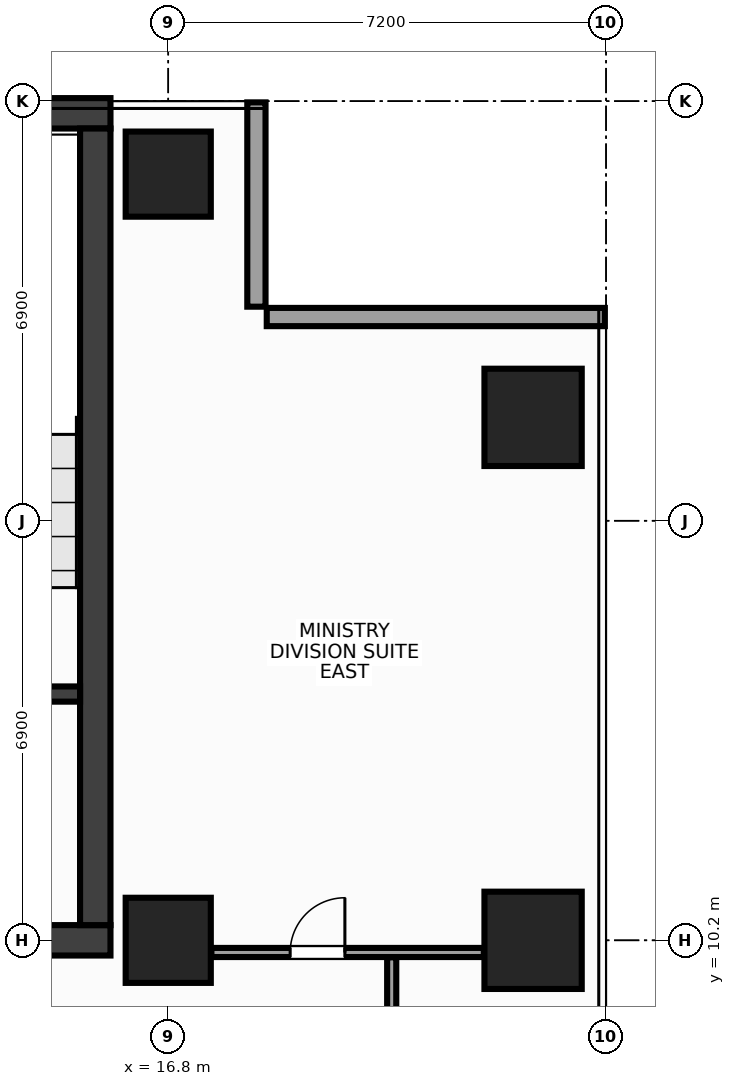
"""IFC4 building model, lengths in metres.
Left out: names, types, materials, properties, quantities, classifications, styles, units other than length and angle.
Written with IfcOpenShell. Run it as: python <this file> out.ifc"""

import sys

from ifc_helpers import new_model, si_unit, direction, frame, frame_2d, origin, origin_2d, place, context, subcontext, project, spatial, rectangle, extrude, source, transform, mapped, element, fill, save


model = new_model("IFC4")
c1 = context("Model", 3, precision=1e-05, world=origin(), true_north=direction((0.0, 1.0)))
c2 = subcontext(c1, "Body", "Model", "MODEL_VIEW")
j1 = project(units=[si_unit("LENGTHUNIT", "METRE"), si_unit("PLANEANGLEUNIT", "RADIAN")], contexts=[c1])
p1 = place(None, origin())
s1 = spatial("IfcSite", under=j1, at=p1, CompositionType="ELEMENT")
p2 = place(p1, origin())
s2 = spatial("IfcBuilding", under=s1, at=p2, CompositionType="ELEMENT")
p3 = place(p2, frame((0.0, 0.0, 210.8)))
s3 = spatial("IfcBuildingStorey", under=s2, at=p3, CompositionType="ELEMENT", Elevation=210.8)
m1 = source(origin(), c2, "Body", "SweptSolid", [
    extrude(rectangle(XDim=31.7, YDim=0.5, at=frame_2d((15.85, 0.0))), origin(), (0.0, 0.0, 1.0), 3.6),
])
p4 = place(p3, frame((-15.85, 23.8, 0.0), z_axis=(0.0, 0.0, 1.0), x_axis=(1.0, 0.0, 0.0)))
e1 = element("IfcWall", 1, at=p4, inside=s3, PredefinedType="SHEAR", context=c2, shape_type="MappedRepresentation", body=[
    mapped(m1, transform((0.0, 0.0, 0.0), x_axis=(1.0, 0.0, 0.0), y_axis=(0.0, 1.0, 0.0), z_axis=(0.0, 0.0, 1.0), scale=1.0)),
])
p5 = place(p3, frame((-15.85, 10.2, 0.0), z_axis=(0.0, 0.0, 1.0), x_axis=(1.0, 0.0, 0.0)))
e2 = element("IfcWall", 2, at=p5, inside=s3, PredefinedType="SHEAR", context=c2, shape_type="MappedRepresentation", body=[
    mapped(m1, transform((0.0, 0.0, 0.0), x_axis=(1.0, 0.0, 0.0), y_axis=(0.0, 1.0, 0.0), z_axis=(0.0, 0.0, 1.0), scale=1.0)),
])
p6 = place(p5, frame((1.7, 0.0, 0.0)))
e3 = element("IfcOpeningElement", 3, at=p6, cuts=e2, PredefinedType="OPENING", context=c2, shape_type="SweptSolid", body=[
    extrude(rectangle(XDim=1.6, YDim=2.15, at=frame_2d((0.8, 1.075))), frame((0.0, 0.262, 0.0), z_axis=(0.0, -1.0, 0.0), x_axis=(1.0, 0.0, 0.0)), (0.0, 0.0, 1.0), 0.524),
])
p7 = place(p5, frame((28.4, 0.0, 0.0)))
e4 = element("IfcOpeningElement", 4, at=p7, cuts=e2, PredefinedType="OPENING", context=c2, shape_type="SweptSolid", body=[
    extrude(rectangle(XDim=1.6, YDim=2.15, at=frame_2d((0.8, 1.075))), frame((0.0, 0.262, 0.0), z_axis=(0.0, -1.0, 0.0), x_axis=(1.0, 0.0, 0.0)), (0.0, 0.0, 1.0), 0.524),
])
p8 = place(p5, frame((15.1, 0.0, 0.0)))
e5 = element("IfcOpeningElement", 5, at=p8, cuts=e2, PredefinedType="OPENING", context=c2, shape_type="SweptSolid", body=[
    extrude(rectangle(XDim=1.5, YDim=2.2, at=frame_2d((0.75, 1.1))), frame((0.0, 0.262, 0.0), z_axis=(0.0, -1.0, 0.0), x_axis=(1.0, 0.0, 0.0)), (0.0, 0.0, 1.0), 0.524),
])
m2 = source(origin(), c2, "Body", "SweptSolid", [
    extrude(rectangle(XDim=13.1, YDim=0.5, at=frame_2d((6.55, 0.0))), origin(), (0.0, 0.0, 1.0), 3.6),
])
p9 = place(p3, frame((15.6, 10.45, 0.0), z_axis=(0.0, 0.0, 1.0), x_axis=(0.0, 1.0, 0.0)))
e6 = element("IfcWall", 6, at=p9, inside=s3, PredefinedType="SHEAR", context=c2, shape_type="MappedRepresentation", body=[
    mapped(m2, transform((0.0, 0.0, 0.0), x_axis=(1.0, 0.0, 0.0), y_axis=(0.0, 1.0, 0.0), z_axis=(0.0, 0.0, 1.0), scale=1.0)),
])
m3 = source(origin(), c2, "Body", "SweptSolid", [
    extrude(rectangle(XDim=3.705, YDim=0.25, at=frame_2d((1.853, 0.0))), origin(), (0.0, 0.0, 1.0), 3.6),
])
p10 = place(p3, frame((11.645, 14.25, 0.0), z_axis=(0.0, 0.0, 1.0), x_axis=(1.0, 0.0, 0.0)))
e7 = element("IfcWall", 7, at=p10, inside=s3, PredefinedType="SHEAR", context=c2, shape_type="MappedRepresentation", body=[
    mapped(m3, transform((0.0, 0.0, 0.0), x_axis=(1.0, 0.0, 0.0), y_axis=(0.0, 1.0, 0.0), z_axis=(0.0, 0.0, 1.0), scale=1.0)),
])
p11 = place(p10, frame((0.95, 0.0, 0.0)))
e8 = element("IfcOpeningElement", 8, at=p11, cuts=e7, PredefinedType="OPENING", context=c2, shape_type="SweptSolid", body=[
    extrude(rectangle(XDim=1.6, YDim=2.15, at=frame_2d((0.8, 1.075))), frame((0.0, 0.137, 0.0), z_axis=(0.0, -1.0, 0.0), x_axis=(1.0, 0.0, 0.0)), (0.0, 0.0, 1.0), 0.274),
])
m4 = source(origin(), c2, "Body", "SweptSolid", [
    extrude(rectangle(XDim=1.4, YDim=1.4, at=origin_2d()), origin(), (0.0, 0.0, 1.0), 3.6),
])
for number, where, z_axis, x_axis in (
    (9, (16.8, 10.2, 0.0), (0.0, 0.0, 1.0), (1.0, 0.0, 0.0)),
    (10, (16.8, 22.8, 0.0), (0.0, 0.0, 1.0), (1.0, 0.0, 0.0)),
):
    element("IfcColumn", number, at=place(p3, frame(where, z_axis=z_axis, x_axis=x_axis)), inside=s3, PredefinedType="COLUMN", context=c2, shape_type="MappedRepresentation", body=[
        mapped(m4, transform((0.0, 0.0, 0.0), x_axis=(1.0, 0.0, 0.0), y_axis=(0.0, 1.0, 0.0), z_axis=(0.0, 0.0, 1.0), scale=1.0)),
    ])
m5 = source(origin(), c2, "Body", "SweptSolid", [
    extrude(rectangle(XDim=1.6, YDim=1.6, at=origin_2d()), origin(), (0.0, 0.0, 1.0), 3.6),
])
for number, where, z_axis, x_axis in (
    (11, (22.8, 10.2, 0.0), (0.0, 0.0, 1.0), (1.0, 0.0, 0.0)),
    (12, (22.8, 18.8, 0.0), (0.0, 0.0, 1.0), (1.0, 0.0, 0.0)),
):
    element("IfcColumn", number, at=place(p3, frame(where, z_axis=z_axis, x_axis=x_axis)), inside=s3, PredefinedType="COLUMN", context=c2, shape_type="MappedRepresentation", body=[
        mapped(m5, transform((0.0, 0.0, 0.0), x_axis=(1.0, 0.0, 0.0), y_axis=(0.0, 1.0, 0.0), z_axis=(0.0, 0.0, 1.0), scale=1.0)),
    ])
m6 = source(origin(), c2, "Body", "SweptSolid", [
    extrude(rectangle(XDim=5.56, YDim=0.3, at=frame_2d((2.78, 0.0))), origin(), (0.0, 0.0, 1.0), 2.76),
])
p12 = place(p3, frame((23.98, 20.45, 0.0), z_axis=(0.0, 0.0, 1.0), x_axis=(-1.0, 0.0, 0.0)))
e13 = element("IfcWall", 13, at=p12, inside=s3, PredefinedType="STANDARD", context=c2, shape_type="MappedRepresentation", body=[
    mapped(m6, transform((0.0, 0.0, 0.0), x_axis=(1.0, 0.0, 0.0), y_axis=(0.0, 1.0, 0.0), z_axis=(0.0, 0.0, 1.0), scale=1.0)),
])
m7 = source(origin(), c2, "Body", "SweptSolid", [
    extrude(rectangle(XDim=3.36, YDim=0.3, at=frame_2d((1.68, 0.0))), origin(), (0.0, 0.0, 1.0), 2.76),
])
p13 = place(p3, frame((18.25, 20.62, 0.0), z_axis=(0.0, 0.0, 1.0), x_axis=(0.0, 1.0, 0.0)))
e14 = element("IfcWall", 14, at=p13, inside=s3, PredefinedType="STANDARD", context=c2, shape_type="MappedRepresentation", body=[
    mapped(m7, transform((0.0, 0.0, 0.0), x_axis=(1.0, 0.0, 0.0), y_axis=(0.0, 1.0, 0.0), z_axis=(0.0, 0.0, 1.0), scale=1.0)),
])
m8 = source(origin(), c2, "Body", "SweptSolid", [
    extrude(rectangle(XDim=4.48, YDim=0.15, at=frame_2d((2.24, 0.0))), origin(), (0.0, 0.0, 1.0), 2.915),
])
p14 = place(p3, frame((17.51, 10.0, 0.0), z_axis=(0.0, 0.0, 1.0), x_axis=(1.0, 0.0, 0.0)))
e15 = element("IfcWall", 15, at=p14, inside=s3, PredefinedType="PARTITIONING", context=c2, shape_type="MappedRepresentation", body=[
    mapped(m8, transform((0.0, 0.0, 0.0), x_axis=(1.0, 0.0, 0.0), y_axis=(0.0, 1.0, 0.0), z_axis=(0.0, 0.0, 1.0), scale=1.0)),
])
p15 = place(p14, frame((1.295, 0.0, 0.0)))
e16 = element("IfcOpeningElement", 16, at=p15, cuts=e15, PredefinedType="OPENING", context=c2, shape_type="SweptSolid", body=[
    extrude(rectangle(XDim=0.9, YDim=2.15, at=frame_2d((0.45, 1.075))), frame((0.0, 0.087, 0.0), z_axis=(0.0, -1.0, 0.0), x_axis=(1.0, 0.0, 0.0)), (0.0, 0.0, 1.0), 0.174),
])
m9 = source(origin(), c2, "Body", "SweptSolid", [
    extrude(rectangle(XDim=2.365, YDim=0.15, at=frame_2d((1.183, 0.0))), origin(), (0.0, 0.0, 1.0), 3.38),
])
p16 = place(p3, frame((20.475, 7.555, 0.0), z_axis=(0.0, 0.0, 1.0), x_axis=(0.0, 1.0, 0.0)))
e17 = element("IfcWall", 17, at=p16, inside=s3, PredefinedType="PARTITIONING", context=c2, shape_type="MappedRepresentation", body=[
    mapped(m9, transform((0.0, 0.0, 0.0), x_axis=(1.0, 0.0, 0.0), y_axis=(0.0, 1.0, 0.0), z_axis=(0.0, 0.0, 1.0), scale=1.0)),
])
m10 = source(origin(), c2, "Body", "SweptSolid", [
    extrude(rectangle(XDim=0.9, YDim=2.15, at=frame_2d((0.45, 1.075))), frame((0.0, 0.025, 0.0), z_axis=(0.0, -1.0, 0.0), x_axis=(1.0, 0.0, 0.0)), (0.0, 0.0, 1.0), 0.05),
])
p17 = place(p15, origin())
e18 = element("IfcDoor", 18, at=p17, inside=s3, OperationType="SINGLE_SWING_RIGHT", PredefinedType="DOOR", context=c2, shape_type="MappedRepresentation", body=[
    mapped(m10, transform((0.0, 0.0, 0.0), x_axis=(1.0, 0.0, 0.0), y_axis=(0.0, 1.0, 0.0), z_axis=(0.0, 0.0, 1.0), scale=1.0)),
])
fill(e16, e18)
save(model, sys.argv[1])
